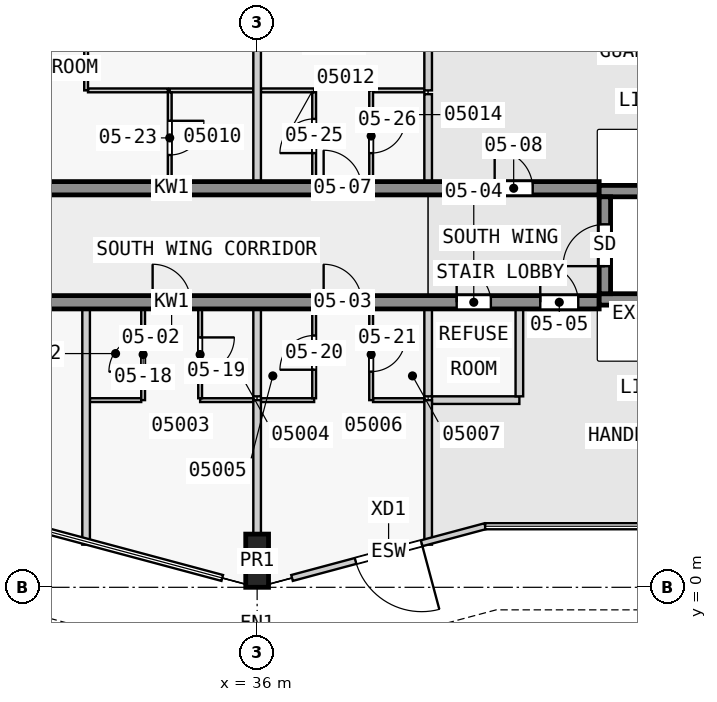
"""IFC4 building model, lengths in metres.
Left out: names, types, materials, properties, quantities, classifications, styles, units other than length and angle.
Written with IfcOpenShell. Run it as: python <this file> out.ifc"""

import sys

from ifc_helpers import new_model, si_unit, direction, frame, frame_2d, origin, origin_2d, place, context, subcontext, project, spatial, rectangle, extrude, element, fill, save


model = new_model("IFC4")
c1 = context("Model", 3, precision=1e-05, world=origin(), true_north=direction((0.0, 1.0)))
c2 = subcontext(c1, "Body", "Model", "MODEL_VIEW")
j1 = project(units=[si_unit("LENGTHUNIT", "METRE"), si_unit("PLANEANGLEUNIT", "RADIAN")], contexts=[c1])
p1 = place(None, origin())
s1 = spatial("IfcSite", under=j1, at=p1, CompositionType="ELEMENT")
p2 = place(p1, origin())
s2 = spatial("IfcBuilding", under=s1, at=p2, CompositionType="ELEMENT")
p3 = place(p2, frame((0.0, 0.0, 26.8)))
s3 = spatial("IfcBuildingStorey", under=s2, at=p3, CompositionType="ELEMENT", Elevation=26.8)
p4 = place(p3, frame((36.0, 0.7, 0.0), z_axis=(0.0, 0.0, 1.0), x_axis=(1.0, 0.0, 0.0)))
e1 = element("IfcColumn", 1, at=p4, inside=s3, PredefinedType="COLUMN", context=c2, shape_type="SweptSolid", body=[
    extrude(rectangle(XDim=0.6, YDim=1.4, at=origin_2d()), origin(), (0.0, 0.0, 1.0), 3.5),
])
p5 = place(p3, frame((45.15, 7.725, 0.0), z_axis=(0.0, 0.0, 1.0), x_axis=(0.0, 1.0, 0.0)))
e2 = element("IfcWall", 2, at=p5, inside=s3, PredefinedType="SHEAR", context=c2, shape_type="SweptSolid", body=[
    extrude(rectangle(XDim=2.55, YDim=0.3, at=frame_2d((1.275, 0.0))), origin(), (0.0, 0.0, 1.0), 3.5),
])
p6 = place(p5, frame((0.725, 0.0, 0.0)))
e3 = element("IfcOpeningElement", 3, at=p6, cuts=e2, PredefinedType="OPENING", context=c2, shape_type="SweptSolid", body=[
    extrude(rectangle(XDim=1.1, YDim=2.1, at=frame_2d((0.55, 1.05))), frame((0.0, 0.16, 0.0), z_axis=(0.0, -1.0, 0.0), x_axis=(1.0, 0.0, 0.0)), (0.0, 0.0, 1.0), 0.32),
])
for number, where, z_axis, x_axis in (
    (4, (45.0, 7.575, 0.0), (0.0, 0.0, 1.0), (1.0, 0.0, 0.0)),
    (5, (45.0, 10.425, 0.0), (0.0, 0.0, 1.0), (1.0, 0.0, 0.0)),
):
    element("IfcWall", number, at=place(p3, frame(where, z_axis=z_axis, x_axis=x_axis)), inside=s3, PredefinedType="SHEAR", context=c2, shape_type="SweptSolid", body=[
        extrude(rectangle(XDim=7.2, YDim=0.3, at=frame_2d((3.6, 0.0))), origin(), (0.0, 0.0, 1.0), 3.5),
    ])
p7 = place(p3, frame((22.5, 7.5, 0.0), z_axis=(0.0, 0.0, 1.0), x_axis=(1.0, 0.0, 0.0)))
e6 = element("IfcWall", 6, at=p7, inside=s3, PredefinedType="SHEAR", context=c2, shape_type="SweptSolid", body=[
    extrude(rectangle(XDim=22.5, YDim=0.35, at=frame_2d((11.25, 0.0))), origin(), (0.0, 0.0, 1.0), 3.25),
])
p8 = place(p7, frame((4.05, 0.0, 0.0)))
e7 = element("IfcOpeningElement", 7, at=p8, cuts=e6, PredefinedType="OPENING", context=c2, shape_type="SweptSolid", body=[
    extrude(rectangle(XDim=1.0, YDim=2.1, at=frame_2d((0.5, 1.05))), frame((0.0, 0.185, 0.0), z_axis=(0.0, -1.0, 0.0), x_axis=(1.0, 0.0, 0.0)), (0.0, 0.0, 1.0), 0.37),
])
p9 = place(p7, frame((10.75, 0.0, 0.0)))
e8 = element("IfcOpeningElement", 8, at=p9, cuts=e6, PredefinedType="OPENING", context=c2, shape_type="SweptSolid", body=[
    extrude(rectangle(XDim=1.0, YDim=2.1, at=frame_2d((0.5, 1.05))), frame((0.0, 0.185, 0.0), z_axis=(0.0, -1.0, 0.0), x_axis=(1.0, 0.0, 0.0)), (0.0, 0.0, 1.0), 0.37),
])
p10 = place(p7, frame((15.25, 0.0, 0.0)))
e9 = element("IfcOpeningElement", 9, at=p10, cuts=e6, PredefinedType="OPENING", context=c2, shape_type="SweptSolid", body=[
    extrude(rectangle(XDim=1.0, YDim=2.1, at=frame_2d((0.5, 1.05))), frame((0.0, 0.185, 0.0), z_axis=(0.0, -1.0, 0.0), x_axis=(1.0, 0.0, 0.0)), (0.0, 0.0, 1.0), 0.37),
])
p11 = place(p7, frame((18.75, 0.0, 0.0)))
e10 = element("IfcOpeningElement", 10, at=p11, cuts=e6, PredefinedType="OPENING", context=c2, shape_type="SweptSolid", body=[
    extrude(rectangle(XDim=0.9, YDim=2.1, at=frame_2d((0.45, 1.05))), frame((0.0, 0.185, 0.0), z_axis=(0.0, -1.0, 0.0), x_axis=(1.0, 0.0, 0.0)), (0.0, 0.0, 1.0), 0.37),
])
p12 = place(p7, frame((20.95, 0.0, 0.0)))
e11 = element("IfcOpeningElement", 11, at=p12, cuts=e6, PredefinedType="OPENING", context=c2, shape_type="SweptSolid", body=[
    extrude(rectangle(XDim=1.0, YDim=2.1, at=frame_2d((0.5, 1.05))), frame((0.0, 0.185, 0.0), z_axis=(0.0, -1.0, 0.0), x_axis=(1.0, 0.0, 0.0)), (0.0, 0.0, 1.0), 0.37),
])
p13 = place(p3, frame((22.5, 10.5, 0.0), z_axis=(0.0, 0.0, 1.0), x_axis=(1.0, 0.0, 0.0)))
e12 = element("IfcWall", 12, at=p13, inside=s3, PredefinedType="SHEAR", context=c2, shape_type="SweptSolid", body=[
    extrude(rectangle(XDim=22.5, YDim=0.35, at=frame_2d((11.25, 0.0))), origin(), (0.0, 0.0, 1.0), 3.25),
])
p14 = place(p13, frame((6.05, 0.0, 0.0)))
e13 = element("IfcOpeningElement", 13, at=p14, cuts=e12, PredefinedType="OPENING", context=c2, shape_type="SweptSolid", body=[
    extrude(rectangle(XDim=1.0, YDim=2.1, at=frame_2d((0.5, 1.05))), frame((0.0, 0.185, 0.0), z_axis=(0.0, -1.0, 0.0), x_axis=(1.0, 0.0, 0.0)), (0.0, 0.0, 1.0), 0.37),
])
p15 = place(p13, frame((15.25, 0.0, 0.0)))
e14 = element("IfcOpeningElement", 14, at=p15, cuts=e12, PredefinedType="OPENING", context=c2, shape_type="SweptSolid", body=[
    extrude(rectangle(XDim=1.0, YDim=2.1, at=frame_2d((0.5, 1.05))), frame((0.0, 0.185, 0.0), z_axis=(0.0, -1.0, 0.0), x_axis=(1.0, 0.0, 0.0)), (0.0, 0.0, 1.0), 0.37),
])
p16 = place(p13, frame((19.75, 0.0, 0.0)))
e15 = element("IfcOpeningElement", 15, at=p16, cuts=e12, PredefinedType="OPENING", context=c2, shape_type="SweptSolid", body=[
    extrude(rectangle(XDim=1.0, YDim=2.1, at=frame_2d((0.5, 1.05))), frame((0.0, 0.185, 0.0), z_axis=(0.0, -1.0, 0.0), x_axis=(1.0, 0.0, 0.0)), (0.0, 0.0, 1.0), 0.37),
])
p17 = place(p3, frame((42.0, 1.607, 0.0), z_axis=(0.0, 0.0, 1.0), x_axis=(-0.965956335063, -0.258705157954, 0.0)))
e16 = element("IfcWall", 16, at=p17, inside=s3, PredefinedType="STANDARD", context=c2, shape_type="SweptSolid", body=[
    extrude(rectangle(XDim=5.261, YDim=0.16, at=frame_2d((2.631, 0.0))), origin(), (0.0, 0.0, 1.0), 3.25),
])
p18 = place(p17, frame((1.73, 0.0, 0.0)))
e17 = element("IfcOpeningElement", 17, at=p18, cuts=e16, PredefinedType="OPENING", context=c2, shape_type="SweptSolid", body=[
    extrude(rectangle(XDim=1.8, YDim=2.4, at=frame_2d((0.9, 1.2))), frame((0.0, 0.09, 0.0), z_axis=(0.0, -1.0, 0.0), x_axis=(1.0, 0.0, 0.0)), (0.0, 0.0, 1.0), 0.18),
])
p19 = place(p3, frame((31.6, 4.925, 0.0), z_axis=(0.0, 0.0, 1.0), x_axis=(1.0, 0.0, 0.0)))
e18 = element("IfcWall", 18, at=p19, inside=s3, PredefinedType="PARTITIONING", context=c2, shape_type="SweptSolid", body=[
    extrude(rectangle(XDim=1.35, YDim=0.1, at=frame_2d((0.675, 0.0))), origin(), (0.0, 0.0, 1.0), 3.25),
])
for number, where, z_axis, x_axis in (
    (19, (34.5, 4.925, 0.0), (0.0, 0.0, 1.0), (1.0, 0.0, 0.0)),
    (20, (36.1, 4.925, 0.0), (0.0, 0.0, 1.0), (1.0, 0.0, 0.0)),
):
    element("IfcWall", number, at=place(p3, frame(where, z_axis=z_axis, x_axis=x_axis)), inside=s3, PredefinedType="PARTITIONING", context=c2, shape_type="SweptSolid", body=[
        extrude(rectangle(XDim=1.4, YDim=0.1, at=frame_2d((0.7, 0.0))), origin(), (0.0, 0.0, 1.0), 3.25),
    ])
p20 = place(p3, frame((39.05, 4.925, 0.0), z_axis=(0.0, 0.0, 1.0), x_axis=(1.0, 0.0, 0.0)))
e21 = element("IfcWall", 21, at=p20, inside=s3, PredefinedType="PARTITIONING", context=c2, shape_type="SweptSolid", body=[
    extrude(rectangle(XDim=1.35, YDim=0.1, at=frame_2d((0.675, 0.0))), origin(), (0.0, 0.0, 1.0), 3.25),
])
p21 = place(p3, frame((40.6, 4.925, 0.0), z_axis=(0.0, 0.0, 1.0), x_axis=(1.0, 0.0, 0.0)))
e22 = element("IfcWall", 22, at=p21, inside=s3, PredefinedType="PARTITIONING", context=c2, shape_type="SweptSolid", body=[
    extrude(rectangle(XDim=2.3, YDim=0.2, at=frame_2d((1.15, 0.0))), origin(), (0.0, 0.0, 1.0), 3.25),
])
p22 = place(p3, frame((35.9, 13.075, 0.0), z_axis=(0.0, 0.0, 1.0), x_axis=(-1.0, 0.0, 0.0)))
e23 = element("IfcWall", 23, at=p22, inside=s3, PredefinedType="PARTITIONING", context=c2, shape_type="SweptSolid", body=[
    extrude(rectangle(XDim=2.2, YDim=0.1, at=frame_2d((1.1, 0.0))), origin(), (0.0, 0.0, 1.0), 3.25),
])
p23 = place(p3, frame((37.5, 13.075, 0.0), z_axis=(0.0, 0.0, 1.0), x_axis=(-1.0, 0.0, 0.0)))
e24 = element("IfcWall", 24, at=p23, inside=s3, PredefinedType="PARTITIONING", context=c2, shape_type="SweptSolid", body=[
    extrude(rectangle(XDim=1.4, YDim=0.1, at=frame_2d((0.7, 0.0))), origin(), (0.0, 0.0, 1.0), 3.25),
])
p24 = place(p3, frame((40.4, 13.075, 0.0), z_axis=(0.0, 0.0, 1.0), x_axis=(-1.0, 0.0, 0.0)))
e25 = element("IfcWall", 25, at=p24, inside=s3, PredefinedType="PARTITIONING", context=c2, shape_type="SweptSolid", body=[
    extrude(rectangle(XDim=1.35, YDim=0.1, at=frame_2d((0.675, 0.0))), origin(), (0.0, 0.0, 1.0), 3.25),
])
p25 = place(p3, frame((31.55, 13.075, 0.0), z_axis=(0.0, 0.0, 1.0), x_axis=(1.0, 0.0, 0.0)))
e26 = element("IfcWall", 26, at=p25, inside=s3, PredefinedType="PARTITIONING", context=c2, shape_type="SweptSolid", body=[
    extrude(rectangle(XDim=2.1, YDim=0.1, at=frame_2d((1.05, 0.0))), origin(), (0.0, 0.0, 1.0), 3.25),
])
p26 = place(p3, frame((31.5, 16.878, 0.0), z_axis=(0.0, 0.0, 1.0), x_axis=(0.0, -1.0, 0.0)))
e27 = element("IfcWall", 27, at=p26, inside=s3, PredefinedType="PARTITIONING", context=c2, shape_type="SweptSolid", body=[
    extrude(rectangle(XDim=3.803, YDim=0.1, at=frame_2d((1.901, 0.0))), origin(), (0.0, 0.0, 1.0), 3.25),
])
p27 = place(p26, frame((1.55, 0.0, 0.0)))
e28 = element("IfcOpeningElement", 28, at=p27, cuts=e27, PredefinedType="OPENING", context=c2, shape_type="SweptSolid", body=[
    extrude(rectangle(XDim=0.9, YDim=2.1, at=frame_2d((0.45, 1.05))), frame((0.0, 0.06, 0.0), z_axis=(0.0, -1.0, 0.0), x_axis=(1.0, 0.0, 0.0)), (0.0, 0.0, 1.0), 0.12),
])
p28 = place(p3, frame((31.5, 1.122, 0.0), z_axis=(0.0, 0.0, 1.0), x_axis=(0.0, 1.0, 0.0)))
e29 = element("IfcWall", 29, at=p28, inside=s3, PredefinedType="PARTITIONING", context=c2, shape_type="SweptSolid", body=[
    extrude(rectangle(XDim=6.203, YDim=0.2, at=frame_2d((3.101, 0.0))), origin(), (0.0, 0.0, 1.0), 3.25),
])
p29 = place(p3, frame((33.0, 4.925, 0.0), z_axis=(0.0, 0.0, 1.0), x_axis=(0.0, 1.0, 0.0)))
e30 = element("IfcWall", 30, at=p29, inside=s3, PredefinedType="PARTITIONING", context=c2, shape_type="SweptSolid", body=[
    extrude(rectangle(XDim=2.4, YDim=0.1, at=frame_2d((1.2, 0.0))), origin(), (0.0, 0.0, 1.0), 3.25),
])
p30 = place(p29, frame((0.75, 0.0, 0.0)))
e31 = element("IfcOpeningElement", 31, at=p30, cuts=e30, PredefinedType="OPENING", context=c2, shape_type="SweptSolid", body=[
    extrude(rectangle(XDim=0.9, YDim=2.1, at=frame_2d((0.45, 1.05))), frame((0.0, 0.06, 0.0), z_axis=(0.0, -1.0, 0.0), x_axis=(1.0, 0.0, 0.0)), (0.0, 0.0, 1.0), 0.12),
])
p31 = place(p3, frame((33.7, 13.025, 0.0), z_axis=(0.0, 0.0, 1.0), x_axis=(0.0, -1.0, 0.0)))
e32 = element("IfcWall", 32, at=p31, inside=s3, PredefinedType="PARTITIONING", context=c2, shape_type="SweptSolid", body=[
    extrude(rectangle(XDim=2.35, YDim=0.1, at=frame_2d((1.175, 0.0))), origin(), (0.0, 0.0, 1.0), 3.25),
])
p32 = place(p31, frame((0.75, 0.0, 0.0)))
e33 = element("IfcOpeningElement", 33, at=p32, cuts=e32, PredefinedType="OPENING", context=c2, shape_type="SweptSolid", body=[
    extrude(rectangle(XDim=0.9, YDim=2.1, at=frame_2d((0.45, 1.05))), frame((0.0, 0.06, 0.0), z_axis=(0.0, -1.0, 0.0), x_axis=(1.0, 0.0, 0.0)), (0.0, 0.0, 1.0), 0.12),
])
p33 = place(p3, frame((34.5, 7.325, 0.0), z_axis=(0.0, 0.0, 1.0), x_axis=(0.0, -1.0, 0.0)))
e34 = element("IfcWall", 34, at=p33, inside=s3, PredefinedType="PARTITIONING", context=c2, shape_type="SweptSolid", body=[
    extrude(rectangle(XDim=2.35, YDim=0.1, at=frame_2d((1.175, 0.0))), origin(), (0.0, 0.0, 1.0), 3.25),
])
p34 = place(p33, frame((0.75, 0.0, 0.0)))
e35 = element("IfcOpeningElement", 35, at=p34, cuts=e34, PredefinedType="OPENING", context=c2, shape_type="SweptSolid", body=[
    extrude(rectangle(XDim=0.9, YDim=2.1, at=frame_2d((0.45, 1.05))), frame((0.0, 0.06, 0.0), z_axis=(0.0, -1.0, 0.0), x_axis=(1.0, 0.0, 0.0)), (0.0, 0.0, 1.0), 0.12),
])
p35 = place(p3, frame((36.0, 4.925, 0.0), z_axis=(0.0, 0.0, 1.0), x_axis=(0.0, -1.0, 0.0)))
e36 = element("IfcWall", 36, at=p35, inside=s3, PredefinedType="PARTITIONING", context=c2, shape_type="SweptSolid", body=[
    extrude(rectangle(XDim=3.525, YDim=0.2, at=frame_2d((1.763, 0.0))), origin(), (0.0, 0.0, 1.0), 3.25),
])
p36 = place(p3, frame((36.0, 5.025, 0.0), z_axis=(0.0, 0.0, 1.0), x_axis=(0.0, 1.0, 0.0)))
e37 = element("IfcWall", 37, at=p36, inside=s3, PredefinedType="PARTITIONING", context=c2, shape_type="SweptSolid", body=[
    extrude(rectangle(XDim=2.3, YDim=0.2, at=frame_2d((1.15, 0.0))), origin(), (0.0, 0.0, 1.0), 3.25),
])
p37 = place(p3, frame((36.0, 10.675, 0.0), z_axis=(0.0, 0.0, 1.0), x_axis=(0.0, 1.0, 0.0)))
e38 = element("IfcWall", 38, at=p37, inside=s3, PredefinedType="PARTITIONING", context=c2, shape_type="SweptSolid", body=[
    extrude(rectangle(XDim=5.925, YDim=0.2, at=frame_2d((2.962, 0.0))), origin(), (0.0, 0.0, 1.0), 3.25),
])
p38 = place(p3, frame((37.5, 4.975, 0.0), z_axis=(0.0, 0.0, 1.0), x_axis=(0.0, 1.0, 0.0)))
e39 = element("IfcWall", 39, at=p38, inside=s3, PredefinedType="PARTITIONING", context=c2, shape_type="SweptSolid", body=[
    extrude(rectangle(XDim=2.35, YDim=0.1, at=frame_2d((1.175, 0.0))), origin(), (0.0, 0.0, 1.0), 3.25),
])
p39 = place(p38, frame((0.75, 0.0, 0.0)))
e40 = element("IfcOpeningElement", 40, at=p39, cuts=e39, PredefinedType="OPENING", context=c2, shape_type="SweptSolid", body=[
    extrude(rectangle(XDim=0.9, YDim=2.1, at=frame_2d((0.45, 1.05))), frame((0.0, 0.06, 0.0), z_axis=(0.0, -1.0, 0.0), x_axis=(1.0, 0.0, 0.0)), (0.0, 0.0, 1.0), 0.12),
])
p40 = place(p3, frame((37.5, 10.675, 0.0), z_axis=(0.0, 0.0, 1.0), x_axis=(0.0, 1.0, 0.0)))
e41 = element("IfcWall", 41, at=p40, inside=s3, PredefinedType="PARTITIONING", context=c2, shape_type="SweptSolid", body=[
    extrude(rectangle(XDim=2.35, YDim=0.1, at=frame_2d((1.175, 0.0))), origin(), (0.0, 0.0, 1.0), 3.25),
])
p41 = place(p40, frame((0.75, 0.0, 0.0)))
e42 = element("IfcOpeningElement", 42, at=p41, cuts=e41, PredefinedType="OPENING", context=c2, shape_type="SweptSolid", body=[
    extrude(rectangle(XDim=0.9, YDim=2.1, at=frame_2d((0.45, 1.05))), frame((0.0, 0.06, 0.0), z_axis=(0.0, -1.0, 0.0), x_axis=(1.0, 0.0, 0.0)), (0.0, 0.0, 1.0), 0.12),
])
p42 = place(p3, frame((39.0, 7.325, 0.0), z_axis=(0.0, 0.0, 1.0), x_axis=(0.0, -1.0, 0.0)))
e43 = element("IfcWall", 43, at=p42, inside=s3, PredefinedType="PARTITIONING", context=c2, shape_type="SweptSolid", body=[
    extrude(rectangle(XDim=2.4, YDim=0.1, at=frame_2d((1.2, 0.0))), origin(), (0.0, 0.0, 1.0), 3.25),
])
p43 = place(p42, frame((0.75, 0.0, 0.0)))
e44 = element("IfcOpeningElement", 44, at=p43, cuts=e43, PredefinedType="OPENING", context=c2, shape_type="SweptSolid", body=[
    extrude(rectangle(XDim=0.9, YDim=2.1, at=frame_2d((0.45, 1.05))), frame((0.0, 0.06, 0.0), z_axis=(0.0, -1.0, 0.0), x_axis=(1.0, 0.0, 0.0)), (0.0, 0.0, 1.0), 0.12),
])
p44 = place(p3, frame((39.0, 13.075, 0.0), z_axis=(0.0, 0.0, 1.0), x_axis=(0.0, -1.0, 0.0)))
e45 = element("IfcWall", 45, at=p44, inside=s3, PredefinedType="PARTITIONING", context=c2, shape_type="SweptSolid", body=[
    extrude(rectangle(XDim=2.4, YDim=0.1, at=frame_2d((1.2, 0.0))), origin(), (0.0, 0.0, 1.0), 3.25),
])
p45 = place(p44, frame((0.75, 0.0, 0.0)))
e46 = element("IfcOpeningElement", 46, at=p45, cuts=e45, PredefinedType="OPENING", context=c2, shape_type="SweptSolid", body=[
    extrude(rectangle(XDim=0.9, YDim=2.1, at=frame_2d((0.45, 1.05))), frame((0.0, 0.06, 0.0), z_axis=(0.0, -1.0, 0.0), x_axis=(1.0, 0.0, 0.0)), (0.0, 0.0, 1.0), 0.12),
])
for number, where, z_axis, x_axis in (
    (47, (40.5, 4.925, 0.0), (0.0, 0.0, 1.0), (0.0, -1.0, 0.0)),
    (48, (40.5, 16.878, 0.0), (0.0, 0.0, 1.0), (0.0, -1.0, 0.0)),
):
    element("IfcWall", number, at=place(p3, frame(where, z_axis=z_axis, x_axis=x_axis)), inside=s3, PredefinedType="PARTITIONING", context=c2, shape_type="SweptSolid", body=[
        extrude(rectangle(XDim=3.803, YDim=0.2, at=frame_2d((1.901, 0.0))), origin(), (0.0, 0.0, 1.0), 3.25),
    ])
for number, where, z_axis, x_axis in (
    (49, (40.5, 5.025, 0.0), (0.0, 0.0, 1.0), (0.0, 1.0, 0.0)),
    (50, (40.5, 10.675, 0.0), (0.0, 0.0, 1.0), (0.0, 1.0, 0.0)),
    (51, (42.9, 5.025, 0.0), (0.0, 0.0, 1.0), (0.0, 1.0, 0.0)),
):
    element("IfcWall", number, at=place(p3, frame(where, z_axis=z_axis, x_axis=x_axis)), inside=s3, PredefinedType="PARTITIONING", context=c2, shape_type="SweptSolid", body=[
        extrude(rectangle(XDim=2.3, YDim=0.2, at=frame_2d((1.15, 0.0))), origin(), (0.0, 0.0, 1.0), 3.25),
    ])
p46 = place(p18, origin())
e52 = element("IfcDoor", 52, at=p46, inside=s3, OperationType="SINGLE_SWING_LEFT", PredefinedType="DOOR", context=c2, shape_type="SweptSolid", body=[
    extrude(rectangle(XDim=1.8, YDim=2.4, at=frame_2d((0.9, 1.2))), frame((0.0, 0.025, 0.0), z_axis=(0.0, -1.0, 0.0), x_axis=(1.0, 0.0, 0.0)), (0.0, 0.0, 1.0), 0.05),
])
fill(e17, e52)
p47 = place(p6, origin())
e53 = element("IfcDoor", 53, at=p47, inside=s3, OperationType="SINGLE_SWING_LEFT", PredefinedType="DOOR", context=c2, shape_type="SweptSolid", body=[
    extrude(rectangle(XDim=1.1, YDim=2.1, at=frame_2d((0.55, 1.05))), frame((0.0, 0.025, 0.0), z_axis=(0.0, -1.0, 0.0), x_axis=(1.0, 0.0, 0.0)), (0.0, 0.0, 1.0), 0.05),
])
fill(e3, e53)
p48 = place(p9, origin())
e54 = element("IfcDoor", 54, at=p48, inside=s3, OperationType="SINGLE_SWING_LEFT", PredefinedType="DOOR", context=c2, shape_type="SweptSolid", body=[
    extrude(rectangle(XDim=1.0, YDim=2.1, at=frame_2d((0.5, 1.05))), frame((0.0, 0.025, 0.0), z_axis=(0.0, -1.0, 0.0), x_axis=(1.0, 0.0, 0.0)), (0.0, 0.0, 1.0), 0.05),
])
fill(e8, e54)
p49 = place(p10, origin())
e55 = element("IfcDoor", 55, at=p49, inside=s3, OperationType="SINGLE_SWING_RIGHT", PredefinedType="DOOR", context=c2, shape_type="SweptSolid", body=[
    extrude(rectangle(XDim=1.0, YDim=2.1, at=frame_2d((0.5, 1.05))), frame((0.0, 0.025, 0.0), z_axis=(0.0, -1.0, 0.0), x_axis=(1.0, 0.0, 0.0)), (0.0, 0.0, 1.0), 0.05),
])
fill(e9, e55)
p50 = place(p11, origin())
e56 = element("IfcDoor", 56, at=p50, inside=s3, OperationType="SINGLE_SWING_RIGHT", PredefinedType="DOOR", context=c2, shape_type="SweptSolid", body=[
    extrude(rectangle(XDim=0.9, YDim=2.1, at=frame_2d((0.45, 1.05))), frame((0.0, 0.025, 0.0), z_axis=(0.0, -1.0, 0.0), x_axis=(1.0, 0.0, 0.0)), (0.0, 0.0, 1.0), 0.05),
])
fill(e10, e56)
p51 = place(p12, origin())
e57 = element("IfcDoor", 57, at=p51, inside=s3, OperationType="SINGLE_SWING_RIGHT", PredefinedType="DOOR", context=c2, shape_type="SweptSolid", body=[
    extrude(rectangle(XDim=1.0, YDim=2.1, at=frame_2d((0.5, 1.05))), frame((0.0, 0.025, 0.0), z_axis=(0.0, -1.0, 0.0), x_axis=(1.0, 0.0, 0.0)), (0.0, 0.0, 1.0), 0.05),
])
fill(e11, e57)
p52 = place(p15, origin())
e58 = element("IfcDoor", 58, at=p52, inside=s3, OperationType="SINGLE_SWING_RIGHT", PredefinedType="DOOR", context=c2, shape_type="SweptSolid", body=[
    extrude(rectangle(XDim=1.0, YDim=2.1, at=frame_2d((0.5, 1.05))), frame((0.0, 0.025, 0.0), z_axis=(0.0, -1.0, 0.0), x_axis=(1.0, 0.0, 0.0)), (0.0, 0.0, 1.0), 0.05),
])
fill(e14, e58)
p53 = place(p16, origin())
e59 = element("IfcDoor", 59, at=p53, inside=s3, OperationType="SINGLE_SWING_RIGHT", PredefinedType="DOOR", context=c2, shape_type="SweptSolid", body=[
    extrude(rectangle(XDim=1.0, YDim=2.1, at=frame_2d((0.5, 1.05))), frame((0.0, 0.025, 0.0), z_axis=(0.0, -1.0, 0.0), x_axis=(1.0, 0.0, 0.0)), (0.0, 0.0, 1.0), 0.05),
])
fill(e15, e59)
p54 = place(p30, origin())
e60 = element("IfcDoor", 60, at=p54, inside=s3, OperationType="SINGLE_SWING_LEFT", PredefinedType="DOOR", context=c2, shape_type="SweptSolid", body=[
    extrude(rectangle(XDim=0.9, YDim=2.1, at=frame_2d((0.45, 1.05))), frame((0.0, 0.025, 0.0), z_axis=(0.0, -1.0, 0.0), x_axis=(1.0, 0.0, 0.0)), (0.0, 0.0, 1.0), 0.05),
])
fill(e31, e60)
p55 = place(p34, origin())
e61 = element("IfcDoor", 61, at=p55, inside=s3, OperationType="SINGLE_SWING_RIGHT", PredefinedType="DOOR", context=c2, shape_type="SweptSolid", body=[
    extrude(rectangle(XDim=0.9, YDim=2.1, at=frame_2d((0.45, 1.05))), frame((0.0, 0.025, 0.0), z_axis=(0.0, -1.0, 0.0), x_axis=(1.0, 0.0, 0.0)), (0.0, 0.0, 1.0), 0.05),
])
fill(e35, e61)
p56 = place(p39, origin())
e62 = element("IfcDoor", 62, at=p56, inside=s3, OperationType="SINGLE_SWING_RIGHT", PredefinedType="DOOR", context=c2, shape_type="SweptSolid", body=[
    extrude(rectangle(XDim=0.9, YDim=2.1, at=frame_2d((0.45, 1.05))), frame((0.0, 0.025, 0.0), z_axis=(0.0, -1.0, 0.0), x_axis=(1.0, 0.0, 0.0)), (0.0, 0.0, 1.0), 0.05),
])
fill(e40, e62)
p57 = place(p43, origin())
e63 = element("IfcDoor", 63, at=p57, inside=s3, OperationType="SINGLE_SWING_LEFT", PredefinedType="DOOR", context=c2, shape_type="SweptSolid", body=[
    extrude(rectangle(XDim=0.9, YDim=2.1, at=frame_2d((0.45, 1.05))), frame((0.0, 0.025, 0.0), z_axis=(0.0, -1.0, 0.0), x_axis=(1.0, 0.0, 0.0)), (0.0, 0.0, 1.0), 0.05),
])
fill(e44, e63)
p58 = place(p32, origin())
e64 = element("IfcDoor", 64, at=p58, inside=s3, OperationType="SINGLE_SWING_RIGHT", PredefinedType="DOOR", context=c2, shape_type="SweptSolid", body=[
    extrude(rectangle(XDim=0.9, YDim=2.1, at=frame_2d((0.45, 1.05))), frame((0.0, 0.025, 0.0), z_axis=(0.0, -1.0, 0.0), x_axis=(1.0, 0.0, 0.0)), (0.0, 0.0, 1.0), 0.05),
])
fill(e33, e64)
p59 = place(p41, origin())
e65 = element("IfcDoor", 65, at=p59, inside=s3, OperationType="SINGLE_SWING_RIGHT", PredefinedType="DOOR", context=c2, shape_type="SweptSolid", body=[
    extrude(rectangle(XDim=0.9, YDim=2.1, at=frame_2d((0.45, 1.05))), frame((0.0, 0.025, 0.0), z_axis=(0.0, -1.0, 0.0), x_axis=(1.0, 0.0, 0.0)), (0.0, 0.0, 1.0), 0.05),
])
fill(e42, e65)
p60 = place(p45, origin())
e66 = element("IfcDoor", 66, at=p60, inside=s3, OperationType="SINGLE_SWING_RIGHT", PredefinedType="DOOR", context=c2, shape_type="SweptSolid", body=[
    extrude(rectangle(XDim=0.9, YDim=2.1, at=frame_2d((0.45, 1.05))), frame((0.0, 0.025, 0.0), z_axis=(0.0, -1.0, 0.0), x_axis=(1.0, 0.0, 0.0)), (0.0, 0.0, 1.0), 0.05),
])
fill(e46, e66)
save(model, sys.argv[1])
